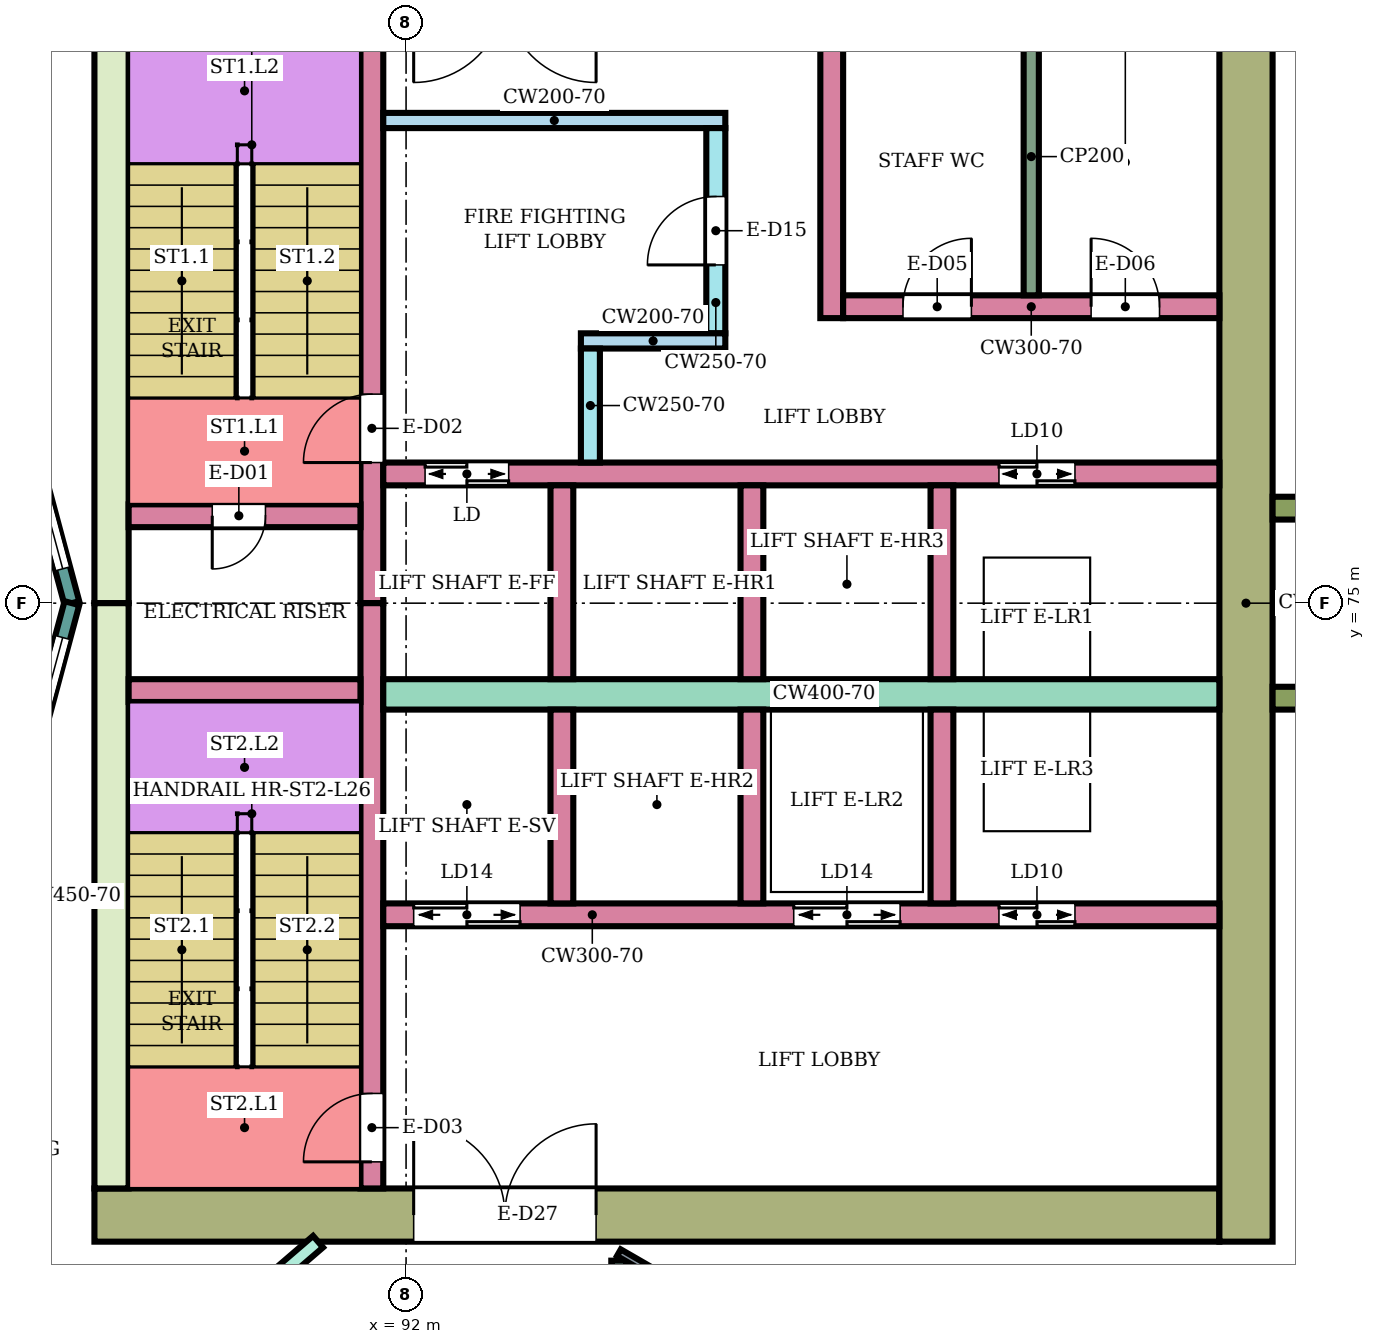
"""IFC4 building model, lengths in metres.
Left out: names, types, materials, properties, quantities, classifications, styles, units other than length and angle.
Written with IfcOpenShell. Run it as: python <this file> out.ifc"""

import sys

from ifc_helpers import new_model, si_unit, direction, frame, frame_2d, origin, place, context, subcontext, project, spatial, rectangle, extrude, element, fill, save


model = new_model("IFC4")
c1 = context("Model", 3, precision=1e-05, world=origin(), true_north=direction((0.0, 1.0)))
c2 = subcontext(c1, "Body", "Model", "MODEL_VIEW")
j1 = project(units=[si_unit("LENGTHUNIT", "METRE"), si_unit("PLANEANGLEUNIT", "RADIAN")], contexts=[c1])
p1 = place(None, origin())
s1 = spatial("IfcSite", under=j1, at=p1, CompositionType="ELEMENT")
p2 = place(p1, origin())
s2 = spatial("IfcBuilding", under=s1, at=p2, CompositionType="ELEMENT")
p3 = place(p2, frame((0.0, 0.0, 114.6)))
s3 = spatial("IfcBuildingStorey", under=s2, at=p3, CompositionType="ELEMENT", Elevation=114.6)
p4 = place(p3, frame((87.9, 66.95, 0.0), z_axis=(0.0, 0.0, 1.0), x_axis=(1.0, 0.0, 0.0)))
e1 = element("IfcWall", 1, at=p4, inside=s3, PredefinedType="SHEAR", context=c2, shape_type="SweptSolid", body=[
    extrude(rectangle(XDim=14.8, YDim=0.7, at=frame_2d((7.4, 0.0))), origin(), (0.0, 0.0, 1.0), 3.58),
])
p5 = place(p4, frame((4.2, 0.0, 0.0)))
e2 = element("IfcOpeningElement", 2, at=p5, cuts=e1, PredefinedType="OPENING", context=c2, shape_type="SweptSolid", body=[
    extrude(rectangle(XDim=2.4, YDim=2.4, at=frame_2d((1.2, 1.2))), frame((0.0, 0.36, 0.0), z_axis=(0.0, -1.0, 0.0), x_axis=(1.0, 0.0, 0.0)), (0.0, 0.0, 1.0), 0.72),
])
for number, where, z_axis, x_axis in (
    (3, (88.125, 75.0, 0.0), (0.0, 0.0, 1.0), (0.0, 1.0, 0.0)),
    (4, (88.125, 67.3, 0.0), (0.0, 0.0, 1.0), (0.0, 1.0, 0.0)),
):
    element("IfcWall", number, at=place(p3, frame(where, z_axis=z_axis, x_axis=x_axis)), inside=s3, PredefinedType="SHEAR", context=c2, shape_type="SweptSolid", body=[
        extrude(rectangle(XDim=7.7, YDim=0.45, at=frame_2d((3.85, 0.0))), origin(), (0.0, 0.0, 1.0), 3.58),
    ])
p6 = place(p3, frame((103.05, 66.6, 0.0), z_axis=(0.0, 0.0, 1.0), x_axis=(0.0, 1.0, 0.0)))
e5 = element("IfcWall", 5, at=p6, inside=s3, PredefinedType="SHEAR", context=c2, shape_type="SweptSolid", body=[
    extrude(rectangle(XDim=16.8, YDim=0.7, at=frame_2d((8.4, 0.0))), origin(), (0.0, 0.0, 1.0), 3.58),
])
p7 = place(p3, frame((91.55, 75.0, 0.0), z_axis=(0.0, 0.0, 1.0), x_axis=(0.0, 1.0, 0.0)))
e6 = element("IfcWall", 6, at=p7, inside=s3, PredefinedType="SHEAR", context=c2, shape_type="SweptSolid", body=[
    extrude(rectangle(XDim=7.7, YDim=0.3, at=frame_2d((3.85, 0.0))), origin(), (0.0, 0.0, 1.0), 3.58),
])
p8 = place(p7, frame((1.85, 0.0, 0.0)))
e7 = element("IfcOpeningElement", 7, at=p8, cuts=e6, PredefinedType="OPENING", context=c2, shape_type="SweptSolid", body=[
    extrude(rectangle(XDim=0.9, YDim=2.1, at=frame_2d((0.45, 1.05))), frame((0.0, 0.16, 0.0), z_axis=(0.0, -1.0, 0.0), x_axis=(1.0, 0.0, 0.0)), (0.0, 0.0, 1.0), 0.32),
])
p9 = place(p3, frame((91.55, 67.3, 0.0), z_axis=(0.0, 0.0, 1.0), x_axis=(0.0, 1.0, 0.0)))
e8 = element("IfcWall", 8, at=p9, inside=s3, PredefinedType="SHEAR", context=c2, shape_type="SweptSolid", body=[
    extrude(rectangle(XDim=7.7, YDim=0.3, at=frame_2d((3.85, 0.0))), origin(), (0.0, 0.0, 1.0), 3.58),
])
p10 = place(p9, frame((0.35, 0.0, 0.0)))
e9 = element("IfcOpeningElement", 9, at=p10, cuts=e8, PredefinedType="OPENING", context=c2, shape_type="SweptSolid", body=[
    extrude(rectangle(XDim=0.9, YDim=2.1, at=frame_2d((0.45, 1.05))), frame((0.0, 0.16, 0.0), z_axis=(0.0, -1.0, 0.0), x_axis=(1.0, 0.0, 0.0)), (0.0, 0.0, 1.0), 0.32),
])
p11 = place(p3, frame((88.35, 76.15, 0.0), z_axis=(0.0, 0.0, 1.0), x_axis=(1.0, 0.0, 0.0)))
e10 = element("IfcWall", 10, at=p11, inside=s3, PredefinedType="SHEAR", context=c2, shape_type="SweptSolid", body=[
    extrude(rectangle(XDim=3.05, YDim=0.3, at=frame_2d((1.525, 0.0))), origin(), (0.0, 0.0, 1.0), 3.58),
])
p12 = place(p11, frame((1.1, 0.0, 0.0)))
e11 = element("IfcOpeningElement", 11, at=p12, cuts=e10, PredefinedType="OPENING", context=c2, shape_type="SweptSolid", body=[
    extrude(rectangle(XDim=0.7, YDim=2.0, at=frame_2d((0.35, 1.0))), frame((0.0, 0.16, 0.0), z_axis=(0.0, -1.0, 0.0), x_axis=(1.0, 0.0, 0.0)), (0.0, 0.0, 1.0), 0.32),
])
p13 = place(p3, frame((88.35, 73.85, 0.0), z_axis=(0.0, 0.0, 1.0), x_axis=(1.0, 0.0, 0.0)))
e12 = element("IfcWall", 12, at=p13, inside=s3, PredefinedType="SHEAR", context=c2, shape_type="SweptSolid", body=[
    extrude(rectangle(XDim=3.05, YDim=0.3, at=frame_2d((1.525, 0.0))), origin(), (0.0, 0.0, 1.0), 3.58),
])
p14 = place(p3, frame((91.7, 76.7, 0.0), z_axis=(0.0, 0.0, 1.0), x_axis=(1.0, 0.0, 0.0)))
e13 = element("IfcWall", 13, at=p14, inside=s3, PredefinedType="SHEAR", context=c2, shape_type="SweptSolid", body=[
    extrude(rectangle(XDim=11.0, YDim=0.3, at=frame_2d((5.5, 0.0))), origin(), (0.0, 0.0, 1.0), 3.58),
])
p15 = place(p14, frame((0.55, 0.0, 0.0)))
e14 = element("IfcOpeningElement", 14, at=p15, cuts=e13, PredefinedType="OPENING", context=c2, shape_type="SweptSolid", body=[
    extrude(rectangle(XDim=1.1, YDim=2.1, at=frame_2d((0.55, 1.05))), frame((0.0, 0.16, 0.0), z_axis=(0.0, -1.0, 0.0), x_axis=(1.0, 0.0, 0.0)), (0.0, 0.0, 1.0), 0.32),
])
p16 = place(p14, frame((8.1, 0.0, 0.0)))
e15 = element("IfcOpeningElement", 15, at=p16, cuts=e13, PredefinedType="OPENING", context=c2, shape_type="SweptSolid", body=[
    extrude(rectangle(XDim=1.0, YDim=2.1, at=frame_2d((0.5, 1.05))), frame((0.0, 0.16, 0.0), z_axis=(0.0, -1.0, 0.0), x_axis=(1.0, 0.0, 0.0)), (0.0, 0.0, 1.0), 0.32),
])
p17 = place(p3, frame((91.7, 73.8, 0.0), z_axis=(0.0, 0.0, 1.0), x_axis=(1.0, 0.0, 0.0)))
e16 = element("IfcWall", 16, at=p17, inside=s3, PredefinedType="SHEAR", context=c2, shape_type="SweptSolid", body=[
    extrude(rectangle(XDim=11.0, YDim=0.4, at=frame_2d((5.5, 0.0))), origin(), (0.0, 0.0, 1.0), 3.58),
])
p18 = place(p3, frame((91.7, 70.9, 0.0), z_axis=(0.0, 0.0, 1.0), x_axis=(1.0, 0.0, 0.0)))
e17 = element("IfcWall", 17, at=p18, inside=s3, PredefinedType="SHEAR", context=c2, shape_type="SweptSolid", body=[
    extrude(rectangle(XDim=11.0, YDim=0.3, at=frame_2d((5.5, 0.0))), origin(), (0.0, 0.0, 1.0), 3.58),
])
p19 = place(p18, frame((0.4, 0.0, 0.0)))
e18 = element("IfcOpeningElement", 18, at=p19, cuts=e17, PredefinedType="OPENING", context=c2, shape_type="SweptSolid", body=[
    extrude(rectangle(XDim=1.4, YDim=2.1, at=frame_2d((0.7, 1.05))), frame((0.0, 0.16, 0.0), z_axis=(0.0, -1.0, 0.0), x_axis=(1.0, 0.0, 0.0)), (0.0, 0.0, 1.0), 0.32),
])
p20 = place(p18, frame((5.4, 0.0, 0.0)))
e19 = element("IfcOpeningElement", 19, at=p20, cuts=e17, PredefinedType="OPENING", context=c2, shape_type="SweptSolid", body=[
    extrude(rectangle(XDim=1.4, YDim=2.1, at=frame_2d((0.7, 1.05))), frame((0.0, 0.16, 0.0), z_axis=(0.0, -1.0, 0.0), x_axis=(1.0, 0.0, 0.0)), (0.0, 0.0, 1.0), 0.32),
])
p21 = place(p18, frame((8.1, 0.0, 0.0)))
e20 = element("IfcOpeningElement", 20, at=p21, cuts=e17, PredefinedType="OPENING", context=c2, shape_type="SweptSolid", body=[
    extrude(rectangle(XDim=1.0, YDim=2.1, at=frame_2d((0.5, 1.05))), frame((0.0, 0.16, 0.0), z_axis=(0.0, -1.0, 0.0), x_axis=(1.0, 0.0, 0.0)), (0.0, 0.0, 1.0), 0.32),
])
for number, where, z_axis, x_axis in (
    (21, (94.05, 74.0, 0.0), (0.0, 0.0, 1.0), (0.0, 1.0, 0.0)),
    (22, (96.55, 74.0, 0.0), (0.0, 0.0, 1.0), (0.0, 1.0, 0.0)),
    (23, (99.05, 74.0, 0.0), (0.0, 0.0, 1.0), (0.0, 1.0, 0.0)),
    (24, (94.05, 71.05, 0.0), (0.0, 0.0, 1.0), (0.0, 1.0, 0.0)),
    (25, (96.55, 71.05, 0.0), (0.0, 0.0, 1.0), (0.0, 1.0, 0.0)),
    (26, (99.05, 71.05, 0.0), (0.0, 0.0, 1.0), (0.0, 1.0, 0.0)),
):
    element("IfcWall", number, at=place(p3, frame(where, z_axis=z_axis, x_axis=x_axis)), inside=s3, PredefinedType="SHEAR", context=c2, shape_type="SweptSolid", body=[
        extrude(rectangle(XDim=2.55, YDim=0.3, at=frame_2d((1.275, 0.0))), origin(), (0.0, 0.0, 1.0), 3.58),
    ])
p22 = place(p3, frame((91.7, 81.35, 0.0), z_axis=(0.0, 0.0, 1.0), x_axis=(1.0, 0.0, 0.0)))
e27 = element("IfcWall", 27, at=p22, inside=s3, PredefinedType="SHEAR", context=c2, shape_type="SweptSolid", body=[
    extrude(rectangle(XDim=4.5, YDim=0.2, at=frame_2d((2.25, 0.0))), origin(), (0.0, 0.0, 1.0), 3.58),
])
p23 = place(p3, frame((96.075, 78.55, 0.0), z_axis=(0.0, 0.0, 1.0), x_axis=(0.0, 1.0, 0.0)))
e28 = element("IfcWall", 28, at=p23, inside=s3, PredefinedType="SHEAR", context=c2, shape_type="SweptSolid", body=[
    extrude(rectangle(XDim=2.7, YDim=0.25, at=frame_2d((1.35, 0.0))), origin(), (0.0, 0.0, 1.0), 3.58),
])
p24 = place(p23, frame((0.9, 0.0, 0.0)))
e29 = element("IfcOpeningElement", 29, at=p24, cuts=e28, PredefinedType="OPENING", context=c2, shape_type="SweptSolid", body=[
    extrude(rectangle(XDim=0.9, YDim=2.1, at=frame_2d((0.45, 1.05))), frame((0.0, 0.135, 0.0), z_axis=(0.0, -1.0, 0.0), x_axis=(1.0, 0.0, 0.0)), (0.0, 0.0, 1.0), 0.27),
])
p25 = place(p3, frame((94.3, 78.45, 0.0), z_axis=(0.0, 0.0, 1.0), x_axis=(1.0, 0.0, 0.0)))
e30 = element("IfcWall", 30, at=p25, inside=s3, PredefinedType="SHEAR", context=c2, shape_type="SweptSolid", body=[
    extrude(rectangle(XDim=1.9, YDim=0.2, at=frame_2d((0.95, 0.0))), origin(), (0.0, 0.0, 1.0), 3.58),
])
p26 = place(p3, frame((94.425, 76.85, 0.0), z_axis=(0.0, 0.0, 1.0), x_axis=(0.0, 1.0, 0.0)))
e31 = element("IfcWall", 31, at=p26, inside=s3, PredefinedType="SHEAR", context=c2, shape_type="SweptSolid", body=[
    extrude(rectangle(XDim=1.5, YDim=0.25, at=frame_2d((0.75, 0.0))), origin(), (0.0, 0.0, 1.0), 3.58),
])
p27 = place(p3, frame((97.6, 78.75, 0.0), z_axis=(0.0, 0.0, 1.0), x_axis=(0.0, 1.0, 0.0)))
e32 = element("IfcWall", 32, at=p27, inside=s3, PredefinedType="SHEAR", context=c2, shape_type="SweptSolid", body=[
    extrude(rectangle(XDim=3.95, YDim=0.3, at=frame_2d((1.975, 0.0))), origin(), (0.0, 0.0, 1.0), 3.58),
])
p28 = place(p3, frame((97.75, 78.9, 0.0), z_axis=(0.0, 0.0, 1.0), x_axis=(1.0, 0.0, 0.0)))
e33 = element("IfcWall", 33, at=p28, inside=s3, PredefinedType="SHEAR", context=c2, shape_type="SweptSolid", body=[
    extrude(rectangle(XDim=4.95, YDim=0.3, at=frame_2d((2.475, 0.0))), origin(), (0.0, 0.0, 1.0), 3.58),
])
p29 = place(p28, frame((0.788, 0.0, 0.0)))
e34 = element("IfcOpeningElement", 34, at=p29, cuts=e33, PredefinedType="OPENING", context=c2, shape_type="SweptSolid", body=[
    extrude(rectangle(XDim=0.9, YDim=2.1, at=frame_2d((0.45, 1.05))), frame((0.0, 0.16, 0.0), z_axis=(0.0, -1.0, 0.0), x_axis=(1.0, 0.0, 0.0)), (0.0, 0.0, 1.0), 0.32),
])
p30 = place(p28, frame((3.262, 0.0, 0.0)))
e35 = element("IfcOpeningElement", 35, at=p30, cuts=e33, PredefinedType="OPENING", context=c2, shape_type="SweptSolid", body=[
    extrude(rectangle(XDim=0.9, YDim=2.1, at=frame_2d((0.45, 1.05))), frame((0.0, 0.16, 0.0), z_axis=(0.0, -1.0, 0.0), x_axis=(1.0, 0.0, 0.0)), (0.0, 0.0, 1.0), 0.32),
])
for number, where, z_axis, x_axis in (
    (36, (103.4, 73.75, 0.0), (0.0, 0.0, 1.0), (1.0, 0.0, 0.0)),
    (37, (103.4, 76.25, 0.0), (0.0, 0.0, 1.0), (1.0, 0.0, 0.0)),
):
    element("IfcWall", number, at=place(p3, frame(where, z_axis=z_axis, x_axis=x_axis)), inside=s3, PredefinedType="NOTDEFINED", context=c2, shape_type="SweptSolid", body=[
        extrude(rectangle(XDim=2.416, YDim=0.3, at=frame_2d((1.208, 0.0))), origin(), (0.0, 0.0, 1.0), 3.9),
    ])
p31 = place(p3, frame((87.604, 75.0, 0.0), z_axis=(0.0, 0.0, 1.0), x_axis=(-0.258789828301, 0.965933654434, 0.0)))
e38 = element("IfcWall", 38, at=p31, inside=s3, PredefinedType="NOTDEFINED", context=c2, shape_type="SweptSolid", body=[
    extrude(rectangle(XDim=3.936, YDim=0.2, at=frame_2d((1.968, 0.0))), origin(), (0.0, 0.0, 1.0), 3.9),
])
p32 = place(p31, frame((0.468, 0.0, 0.9)))
e39 = element("IfcOpeningElement", 39, at=p32, cuts=e38, PredefinedType="OPENING", context=c2, shape_type="SweptSolid", body=[
    extrude(rectangle(XDim=3.0, YDim=2.3, at=frame_2d((1.5, 1.15))), frame((0.0, 0.11, 0.0), z_axis=(0.0, -1.0, 0.0), x_axis=(1.0, 0.0, 0.0)), (0.0, 0.0, 1.0), 0.22),
])
p33 = place(p3, frame((86.585, 71.198, 0.0), z_axis=(0.0, 0.0, 1.0), x_axis=(0.258789828301, 0.965933654434, 0.0)))
e40 = element("IfcWall", 40, at=p33, inside=s3, PredefinedType="NOTDEFINED", context=c2, shape_type="SweptSolid", body=[
    extrude(rectangle(XDim=3.936, YDim=0.2, at=frame_2d((1.968, 0.0))), origin(), (0.0, 0.0, 1.0), 3.9),
])
p34 = place(p33, frame((0.468, 0.0, 0.9)))
e41 = element("IfcOpeningElement", 41, at=p34, cuts=e40, PredefinedType="OPENING", context=c2, shape_type="SweptSolid", body=[
    extrude(rectangle(XDim=3.0, YDim=2.3, at=frame_2d((1.5, 1.15))), frame((0.0, 0.11, 0.0), z_axis=(0.0, -1.0, 0.0), x_axis=(1.0, 0.0, 0.0)), (0.0, 0.0, 1.0), 0.22),
])
p35 = place(p3, frame((86.877, 63.189, 0.0), z_axis=(0.0, 0.0, 1.0), x_axis=(0.758075808328, 0.652166442581, 0.0)))
e42 = element("IfcWall", 42, at=p35, inside=s3, PredefinedType="PARTITIONING", context=c2, shape_type="SweptSolid", body=[
    extrude(rectangle(XDim=5.23, YDim=0.2, at=frame_2d((2.615, 0.0))), origin(), (0.0, 0.0, 1.0), 3.45),
])
p36 = place(p35, frame((2.165, 0.0, 0.0)))
e43 = element("IfcOpeningElement", 43, at=p36, cuts=e42, PredefinedType="OPENING", context=c2, shape_type="SweptSolid", body=[
    extrude(rectangle(XDim=0.9, YDim=2.1, at=frame_2d((0.45, 1.05))), frame((0.0, 0.11, 0.0), z_axis=(0.0, -1.0, 0.0), x_axis=(1.0, 0.0, 0.0)), (0.0, 0.0, 1.0), 0.22),
])
p37 = place(p3, frame((94.8, 65.1, 0.0), z_axis=(0.0, 0.0, 1.0), x_axis=(0.0, 1.0, 0.0)))
e44 = element("IfcWall", 44, at=p37, inside=s3, PredefinedType="PARTITIONING", context=c2, shape_type="SweptSolid", body=[
    extrude(rectangle(XDim=1.25, YDim=0.2, at=frame_2d((0.625, 0.0))), origin(), (0.0, 0.0, 1.0), 3.45),
])
p38 = place(p3, frame((94.8, 66.455, 0.0), z_axis=(0.0, 0.0, 1.0), x_axis=(0.86602264145, -0.500004784474, 0.0)))
e45 = element("IfcWall", 45, at=p38, inside=s3, PredefinedType="PARTITIONING", context=c2, shape_type="SweptSolid", body=[
    extrude(rectangle(XDim=8.708, YDim=0.1, at=frame_2d((4.354, 0.0))), origin(), (0.0, 0.0, 1.0), 3.45),
])
p39 = place(p38, frame((3.879, 0.0, 0.0)))
e46 = element("IfcOpeningElement", 46, at=p39, cuts=e45, PredefinedType="OPENING", context=c2, shape_type="SweptSolid", body=[
    extrude(rectangle(XDim=0.9, YDim=2.1, at=frame_2d((0.45, 1.05))), frame((0.0, 0.06, 0.0), z_axis=(0.0, -1.0, 0.0), x_axis=(1.0, 0.0, 0.0)), (0.0, 0.0, 1.0), 0.12),
])
p40 = place(p3, frame((100.225, 79.05, 0.0), z_axis=(0.0, 0.0, 1.0), x_axis=(0.0, 1.0, 0.0)))
e47 = element("IfcWall", 47, at=p40, inside=s3, PredefinedType="PARTITIONING", context=c2, shape_type="SweptSolid", body=[
    extrude(rectangle(XDim=3.65, YDim=0.2, at=frame_2d((1.825, 0.0))), origin(), (0.0, 0.0, 1.0), 3.58),
])
p41 = place(p32, origin())
e48 = element("IfcWindow", 48, at=p41, inside=s3, PartitioningType="SINGLE_PANEL", PredefinedType="WINDOW", context=c2, shape_type="SweptSolid", body=[
    extrude(rectangle(XDim=3.0, YDim=2.3, at=frame_2d((1.5, 1.15))), frame((0.0, 0.03, 0.0), z_axis=(0.0, -1.0, 0.0), x_axis=(1.0, 0.0, 0.0)), (0.0, 0.0, 1.0), 0.06),
])
fill(e39, e48)
p42 = place(p34, origin())
e49 = element("IfcWindow", 49, at=p42, inside=s3, PartitioningType="SINGLE_PANEL", PredefinedType="WINDOW", context=c2, shape_type="SweptSolid", body=[
    extrude(rectangle(XDim=3.0, YDim=2.3, at=frame_2d((1.5, 1.15))), frame((0.0, 0.03, 0.0), z_axis=(0.0, -1.0, 0.0), x_axis=(1.0, 0.0, 0.0)), (0.0, 0.0, 1.0), 0.06),
])
fill(e41, e49)
p43 = place(p12, frame((0.7, 0.0, 0.0), z_axis=(0.0, 0.0, 1.0), x_axis=(-1.0, 0.0, 0.0)))
e50 = element("IfcDoor", 50, at=p43, inside=s3, OperationType="SINGLE_SWING_RIGHT", PredefinedType="DOOR", context=c2, shape_type="SweptSolid", body=[
    extrude(rectangle(XDim=0.7, YDim=2.0, at=frame_2d((0.35, 1.0))), frame((0.0, 0.025, 0.0), z_axis=(0.0, -1.0, 0.0), x_axis=(1.0, 0.0, 0.0)), (0.0, 0.0, 1.0), 0.05),
])
fill(e11, e50)
p44 = place(p8, origin())
e51 = element("IfcDoor", 51, at=p44, inside=s3, OperationType="SINGLE_SWING_LEFT", PredefinedType="DOOR", context=c2, shape_type="SweptSolid", body=[
    extrude(rectangle(XDim=0.9, YDim=2.1, at=frame_2d((0.45, 1.05))), frame((0.0, 0.025, 0.0), z_axis=(0.0, -1.0, 0.0), x_axis=(1.0, 0.0, 0.0)), (0.0, 0.0, 1.0), 0.05),
])
fill(e7, e51)
p45 = place(p10, origin())
e52 = element("IfcDoor", 52, at=p45, inside=s3, OperationType="SINGLE_SWING_LEFT", PredefinedType="DOOR", context=c2, shape_type="SweptSolid", body=[
    extrude(rectangle(XDim=0.9, YDim=2.1, at=frame_2d((0.45, 1.05))), frame((0.0, 0.025, 0.0), z_axis=(0.0, -1.0, 0.0), x_axis=(1.0, 0.0, 0.0)), (0.0, 0.0, 1.0), 0.05),
])
fill(e9, e52)
p46 = place(p15, origin())
e53 = element("IfcDoor", 53, at=p46, inside=s3, OperationType="DOUBLE_DOOR_SLIDING", PredefinedType="DOOR", context=c2, shape_type="SweptSolid", body=[
    extrude(rectangle(XDim=1.1, YDim=2.1, at=frame_2d((0.55, 1.05))), frame((0.0, 0.025, 0.0), z_axis=(0.0, -1.0, 0.0), x_axis=(1.0, 0.0, 0.0)), (0.0, 0.0, 1.0), 0.05),
])
fill(e14, e53)
p47 = place(p16, origin())
e54 = element("IfcDoor", 54, at=p47, inside=s3, OperationType="DOUBLE_DOOR_SLIDING", PredefinedType="DOOR", context=c2, shape_type="SweptSolid", body=[
    extrude(rectangle(XDim=1.0, YDim=2.1, at=frame_2d((0.5, 1.05))), frame((0.0, 0.025, 0.0), z_axis=(0.0, -1.0, 0.0), x_axis=(1.0, 0.0, 0.0)), (0.0, 0.0, 1.0), 0.05),
])
fill(e15, e54)
p48 = place(p19, origin())
e55 = element("IfcDoor", 55, at=p48, inside=s3, OperationType="DOUBLE_DOOR_SLIDING", PredefinedType="DOOR", context=c2, shape_type="SweptSolid", body=[
    extrude(rectangle(XDim=1.4, YDim=2.1, at=frame_2d((0.7, 1.05))), frame((0.0, 0.025, 0.0), z_axis=(0.0, -1.0, 0.0), x_axis=(1.0, 0.0, 0.0)), (0.0, 0.0, 1.0), 0.05),
])
fill(e18, e55)
p49 = place(p20, origin())
e56 = element("IfcDoor", 56, at=p49, inside=s3, OperationType="DOUBLE_DOOR_SLIDING", PredefinedType="DOOR", context=c2, shape_type="SweptSolid", body=[
    extrude(rectangle(XDim=1.4, YDim=2.1, at=frame_2d((0.7, 1.05))), frame((0.0, 0.025, 0.0), z_axis=(0.0, -1.0, 0.0), x_axis=(1.0, 0.0, 0.0)), (0.0, 0.0, 1.0), 0.05),
])
fill(e19, e56)
p50 = place(p21, origin())
e57 = element("IfcDoor", 57, at=p50, inside=s3, OperationType="DOUBLE_DOOR_SLIDING", PredefinedType="DOOR", context=c2, shape_type="SweptSolid", body=[
    extrude(rectangle(XDim=1.0, YDim=2.1, at=frame_2d((0.5, 1.05))), frame((0.0, 0.025, 0.0), z_axis=(0.0, -1.0, 0.0), x_axis=(1.0, 0.0, 0.0)), (0.0, 0.0, 1.0), 0.05),
])
fill(e20, e57)
p51 = place(p24, origin())
e58 = element("IfcDoor", 58, at=p51, inside=s3, OperationType="SINGLE_SWING_LEFT", PredefinedType="DOOR", context=c2, shape_type="SweptSolid", body=[
    extrude(rectangle(XDim=0.9, YDim=2.1, at=frame_2d((0.45, 1.05))), frame((0.0, 0.025, 0.0), z_axis=(0.0, -1.0, 0.0), x_axis=(1.0, 0.0, 0.0)), (0.0, 0.0, 1.0), 0.05),
])
fill(e29, e58)
p52 = place(p29, origin())
e59 = element("IfcDoor", 59, at=p52, inside=s3, OperationType="SINGLE_SWING_RIGHT", PredefinedType="DOOR", context=c2, shape_type="SweptSolid", body=[
    extrude(rectangle(XDim=0.9, YDim=2.1, at=frame_2d((0.45, 1.05))), frame((0.0, 0.025, 0.0), z_axis=(0.0, -1.0, 0.0), x_axis=(1.0, 0.0, 0.0)), (0.0, 0.0, 1.0), 0.05),
])
fill(e34, e59)
p53 = place(p30, origin())
e60 = element("IfcDoor", 60, at=p53, inside=s3, OperationType="SINGLE_SWING_LEFT", PredefinedType="DOOR", context=c2, shape_type="SweptSolid", body=[
    extrude(rectangle(XDim=0.9, YDim=2.1, at=frame_2d((0.45, 1.05))), frame((0.0, 0.025, 0.0), z_axis=(0.0, -1.0, 0.0), x_axis=(1.0, 0.0, 0.0)), (0.0, 0.0, 1.0), 0.05),
])
fill(e35, e60)
p54 = place(p5, origin())
e61 = element("IfcDoor", 61, at=p54, inside=s3, OperationType="DOUBLE_DOOR_SINGLE_SWING", PredefinedType="DOOR", context=c2, shape_type="SweptSolid", body=[
    extrude(rectangle(XDim=2.4, YDim=2.4, at=frame_2d((1.2, 1.2))), frame((0.0, 0.025, 0.0), z_axis=(0.0, -1.0, 0.0), x_axis=(1.0, 0.0, 0.0)), (0.0, 0.0, 1.0), 0.05),
])
fill(e2, e61)
save(model, sys.argv[1])
